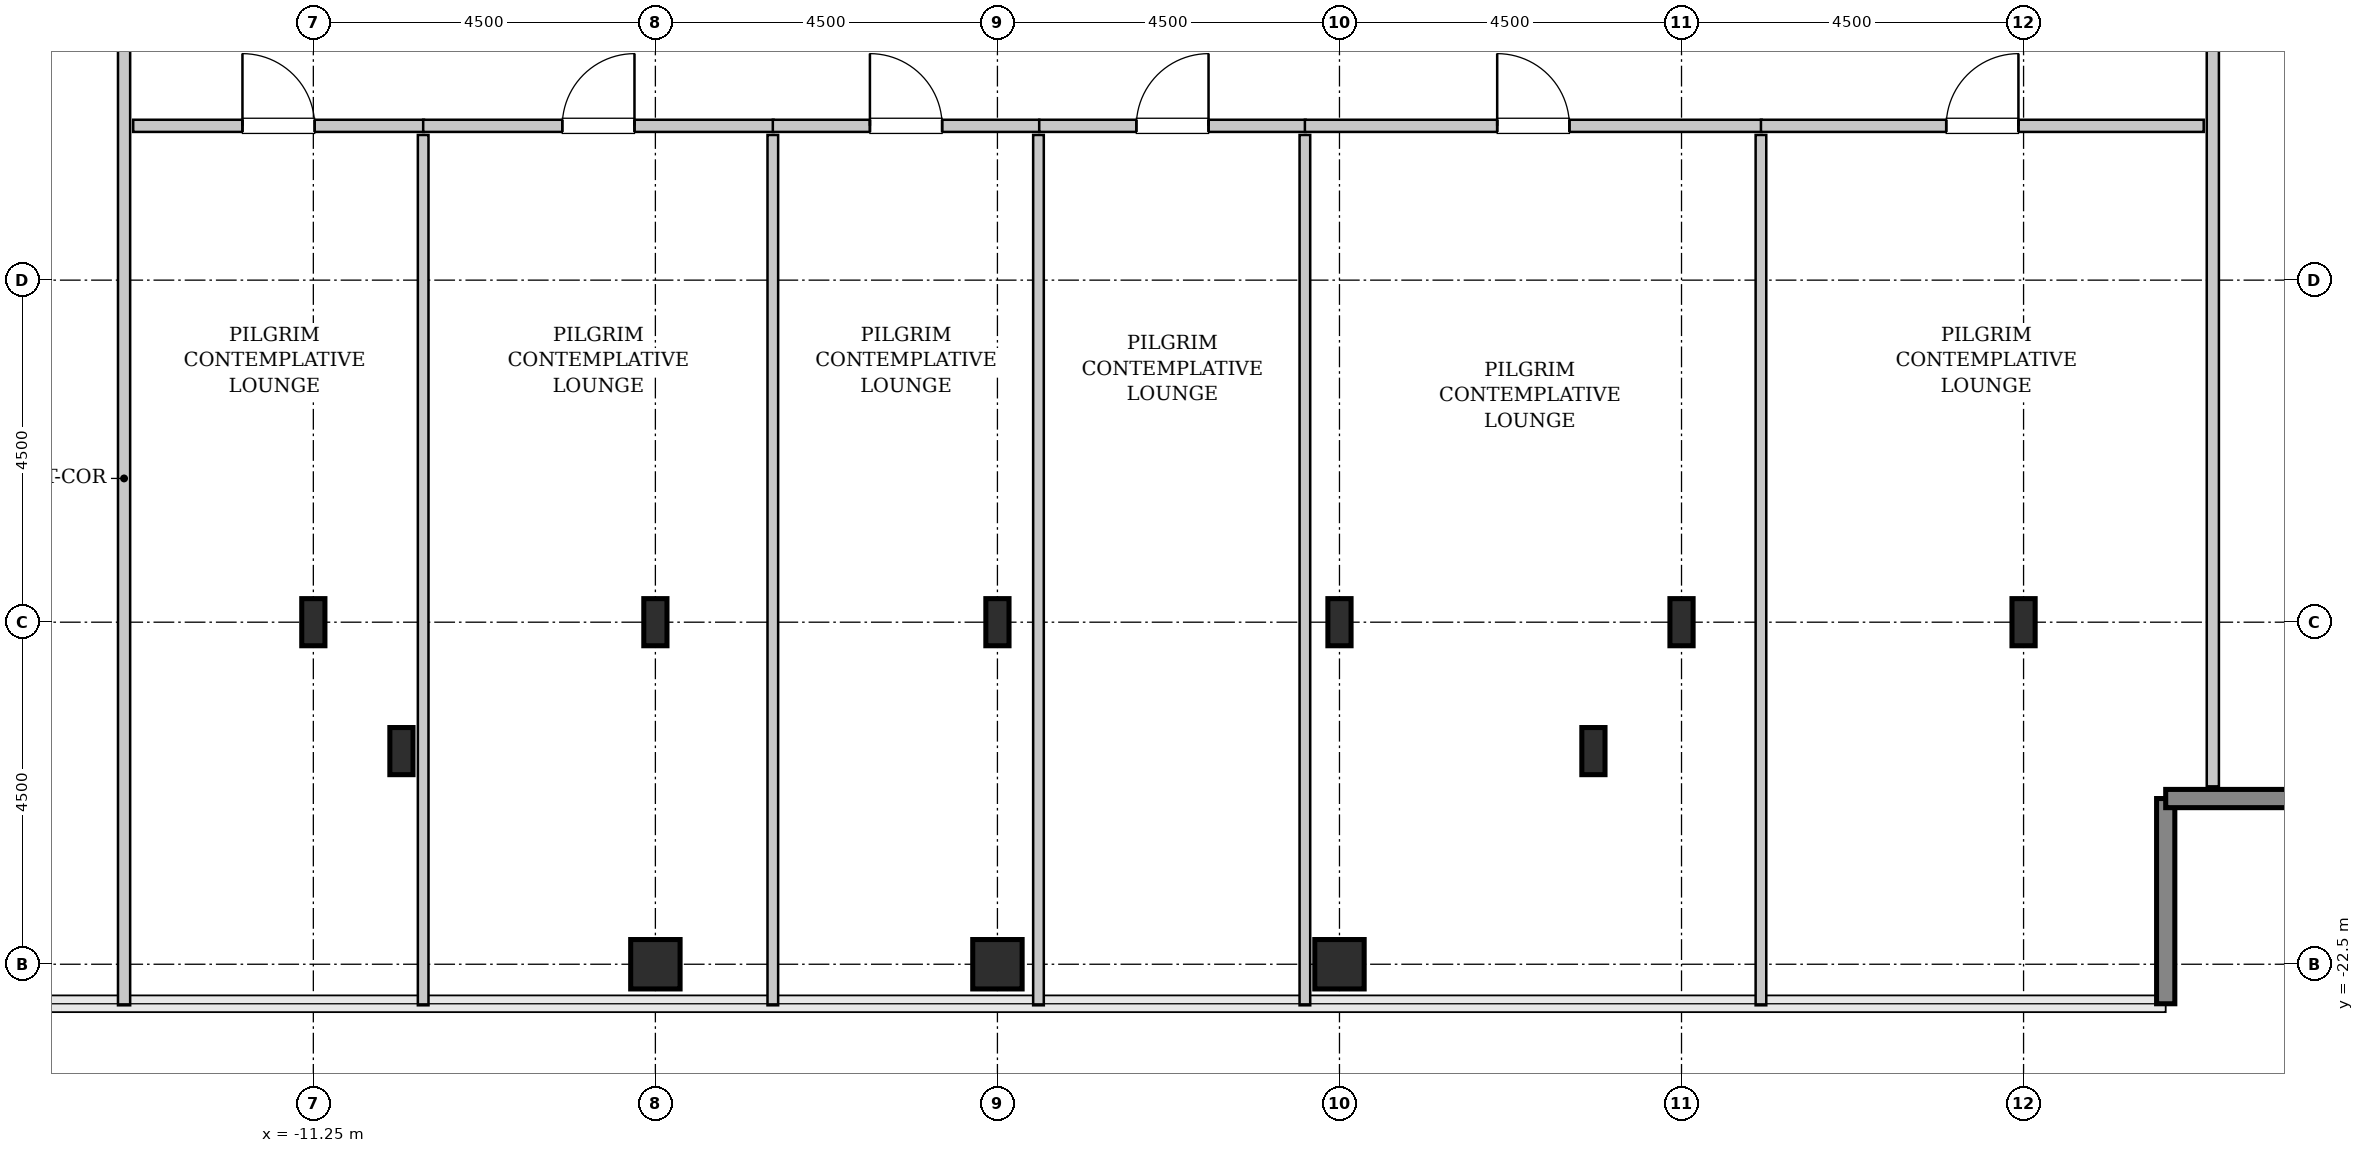
"""IFC4 building model, lengths in metres.
Left out: names, types, materials, properties, quantities, classifications, styles, units other than length and angle.
Written with IfcOpenShell. Run it as: python <this file> out.ifc"""

import sys

from ifc_helpers import new_model, si_unit, direction, frame, frame_2d, origin, origin_2d, place, context, subcontext, project, spatial, rectangle, hollow_rectangle, i_section, extrude, source, transform, mapped, element, fill, save


model = new_model("IFC4")
c1 = context("Model", 3, precision=1e-05, world=origin(), true_north=direction((0.0, 1.0)))
c2 = subcontext(c1, "Body", "Model", "MODEL_VIEW")
j1 = project(units=[si_unit("LENGTHUNIT", "METRE"), si_unit("PLANEANGLEUNIT", "RADIAN")], contexts=[c1])
p1 = place(None, origin())
s1 = spatial("IfcSite", under=j1, at=p1, CompositionType="ELEMENT")
p2 = place(p1, origin())
s2 = spatial("IfcBuilding", under=s1, at=p2, CompositionType="ELEMENT")
p3 = place(p2, frame((0.0, 0.0, 287.4)))
s3 = spatial("IfcBuildingStorey", under=s2, at=p3, CompositionType="ELEMENT", Elevation=287.4)
m1 = source(origin(), c2, "Body", "SweptSolid", [
    extrude(i_section(OverallWidth=0.305, OverallDepth=0.62, WebThickness=0.021, FlangeThickness=0.04, FilletRadius=0.027, at=origin_2d()), origin(), (0.0, 0.0, 1.0), 3.8),
])
for number, where, z_axis, x_axis in (
    (1, (-11.25, -18.0, 0.0), (0.0, 0.0, 1.0), (1.0, 0.0, 0.0)),
    (2, (-10.091, -19.696, 0.0), (0.0, 0.0, 1.0), (1.0, 0.0, 0.0)),
):
    element("IfcColumn", number, at=place(p3, frame(where, z_axis=z_axis, x_axis=x_axis)), inside=s3, PredefinedType="COLUMN", context=c2, shape_type="MappedRepresentation", body=[
        mapped(m1, transform((0.0, 0.0, 0.0), x_axis=(1.0, 0.0, 0.0), y_axis=(0.0, 1.0, 0.0), z_axis=(0.0, 0.0, 1.0), scale=1.0)),
    ])
m2 = source(origin(), c2, "Body", "SweptSolid", [
    extrude(hollow_rectangle(XDim=0.65, YDim=0.65, WallThickness=0.032, InnerFilletRadius=0.032, OuterFilletRadius=0.064, at=origin_2d()), origin(), (0.0, 0.0, 1.0), 3.8),
])
p4 = place(p3, frame((-6.75, -22.5, 0.0), z_axis=(0.0, 0.0, 1.0), x_axis=(1.0, 0.0, 0.0)))
e3 = element("IfcColumn", 3, at=p4, inside=s3, PredefinedType="COLUMN", context=c2, shape_type="MappedRepresentation", body=[
    mapped(m2, transform((0.0, 0.0, 0.0), x_axis=(1.0, 0.0, 0.0), y_axis=(0.0, 1.0, 0.0), z_axis=(0.0, 0.0, 1.0), scale=1.0)),
])
p5 = place(p3, frame((-6.75, -18.0, 0.0), z_axis=(0.0, 0.0, 1.0), x_axis=(1.0, 0.0, 0.0)))
e4 = element("IfcColumn", 4, at=p5, inside=s3, PredefinedType="COLUMN", context=c2, shape_type="MappedRepresentation", body=[
    mapped(m1, transform((0.0, 0.0, 0.0), x_axis=(1.0, 0.0, 0.0), y_axis=(0.0, 1.0, 0.0), z_axis=(0.0, 0.0, 1.0), scale=1.0)),
])
p6 = place(p3, frame((-2.25, -22.5, 0.0), z_axis=(0.0, 0.0, 1.0), x_axis=(1.0, 0.0, 0.0)))
e5 = element("IfcColumn", 5, at=p6, inside=s3, PredefinedType="COLUMN", context=c2, shape_type="MappedRepresentation", body=[
    mapped(m2, transform((0.0, 0.0, 0.0), x_axis=(1.0, 0.0, 0.0), y_axis=(0.0, 1.0, 0.0), z_axis=(0.0, 0.0, 1.0), scale=1.0)),
])
p7 = place(p3, frame((-2.25, -18.0, 0.0), z_axis=(0.0, 0.0, 1.0), x_axis=(1.0, 0.0, 0.0)))
e6 = element("IfcColumn", 6, at=p7, inside=s3, PredefinedType="COLUMN", context=c2, shape_type="MappedRepresentation", body=[
    mapped(m1, transform((0.0, 0.0, 0.0), x_axis=(1.0, 0.0, 0.0), y_axis=(0.0, 1.0, 0.0), z_axis=(0.0, 0.0, 1.0), scale=1.0)),
])
p8 = place(p3, frame((2.25, -22.5, 0.0), z_axis=(0.0, 0.0, 1.0), x_axis=(1.0, 0.0, 0.0)))
e7 = element("IfcColumn", 7, at=p8, inside=s3, PredefinedType="COLUMN", context=c2, shape_type="MappedRepresentation", body=[
    mapped(m2, transform((0.0, 0.0, 0.0), x_axis=(1.0, 0.0, 0.0), y_axis=(0.0, 1.0, 0.0), z_axis=(0.0, 0.0, 1.0), scale=1.0)),
])
for number, where, z_axis, x_axis in (
    (8, (2.25, -18.0, 0.0), (0.0, 0.0, 1.0), (1.0, 0.0, 0.0)),
    (9, (5.591, -19.696, 0.0), (0.0, 0.0, 1.0), (1.0, 0.0, 0.0)),
    (10, (6.75, -18.0, 0.0), (0.0, 0.0, 1.0), (1.0, 0.0, 0.0)),
    (11, (11.25, -18.0, 0.0), (0.0, 0.0, 1.0), (1.0, 0.0, 0.0)),
):
    element("IfcColumn", number, at=place(p3, frame(where, z_axis=z_axis, x_axis=x_axis)), inside=s3, PredefinedType="COLUMN", context=c2, shape_type="MappedRepresentation", body=[
        mapped(m1, transform((0.0, 0.0, 0.0), x_axis=(1.0, 0.0, 0.0), y_axis=(0.0, 1.0, 0.0), z_axis=(0.0, 0.0, 1.0), scale=1.0)),
    ])
m3 = source(origin(), c2, "Body", "SweptSolid", [
    extrude(rectangle(XDim=2.7, YDim=0.24, at=frame_2d((1.35, 0.0))), origin(), (0.0, 0.0, 1.0), 3.55),
])
for number, where, z_axis, x_axis in (
    (12, (13.12, -23.02, 0.0), (0.0, 0.0, 1.0), (0.0, 1.0, 0.0)),
    (13, (13.12, -20.32, 0.0), (0.0, 0.0, 1.0), (1.0, 0.0, 0.0)),
):
    element("IfcWall", number, at=place(p3, frame(where, z_axis=z_axis, x_axis=x_axis)), inside=s3, PredefinedType="SHEAR", context=c2, shape_type="MappedRepresentation", body=[
        mapped(m3, transform((0.0, 0.0, 0.0), x_axis=(1.0, 0.0, 0.0), y_axis=(0.0, 1.0, 0.0), z_axis=(0.0, 0.0, 1.0), scale=1.0)),
    ])
m4 = source(origin(), c2, "Body", "SweptSolid", [
    extrude(rectangle(XDim=17.045, YDim=0.16, at=frame_2d((8.522, 0.0))), origin(), (0.0, 0.0, 1.0), 3.535),
])
p9 = place(p3, frame((-13.74, -23.04, 0.0), z_axis=(0.0, 0.0, 1.0), x_axis=(0.0, 1.0, 0.0)))
e14 = element("IfcWall", 14, at=p9, inside=s3, PredefinedType="PARTITIONING", context=c2, shape_type="MappedRepresentation", body=[
    mapped(m4, transform((0.0, 0.0, 0.0), x_axis=(1.0, 0.0, 0.0), y_axis=(0.0, 1.0, 0.0), z_axis=(0.0, 0.0, 1.0), scale=1.0)),
])
p10 = place(p9, frame((13.812, 0.0, 0.0)))
e15 = element("IfcOpeningElement", 15, at=p10, cuts=e14, PredefinedType="OPENING", context=c2, shape_type="SweptSolid", body=[
    extrude(rectangle(XDim=0.95, YDim=2.1, at=frame_2d((0.475, 1.05))), frame((0.0, 0.09, 0.0), z_axis=(0.0, -1.0, 0.0), x_axis=(1.0, 0.0, 0.0)), (0.0, 0.0, 1.0), 0.18),
])
m5 = source(origin(), c2, "Body", "SweptSolid", [
    extrude(rectangle(XDim=11.665, YDim=0.16, at=frame_2d((5.833, 0.0))), origin(), (0.0, 0.0, 1.0), 3.535),
])
p11 = place(p3, frame((13.74, -20.16, 0.0), z_axis=(0.0, 0.0, 1.0), x_axis=(0.0, 1.0, 0.0)))
e16 = element("IfcWall", 16, at=p11, inside=s3, PredefinedType="PARTITIONING", context=c2, shape_type="MappedRepresentation", body=[
    mapped(m5, transform((0.0, 0.0, 0.0), x_axis=(1.0, 0.0, 0.0), y_axis=(0.0, 1.0, 0.0), z_axis=(0.0, 0.0, 1.0), scale=1.0)),
])
p12 = place(p11, frame((9.683, 0.0, 0.0)))
e17 = element("IfcOpeningElement", 17, at=p12, cuts=e16, PredefinedType="OPENING", context=c2, shape_type="SweptSolid", body=[
    extrude(rectangle(XDim=0.95, YDim=2.1, at=frame_2d((0.475, 1.05))), frame((0.0, 0.09, 0.0), z_axis=(0.0, -1.0, 0.0), x_axis=(1.0, 0.0, 0.0)), (0.0, 0.0, 1.0), 0.18),
])
m6 = source(origin(), c2, "Body", "SweptSolid", [
    extrude(rectangle(XDim=3.825, YDim=0.16, at=frame_2d((1.913, 0.0))), origin(), (0.0, 0.0, 1.0), 3.535),
])
p13 = place(p3, frame((-13.62, -11.47, 0.0), z_axis=(0.0, 0.0, 1.0), x_axis=(1.0, 0.0, 0.0)))
e18 = element("IfcWall", 18, at=p13, inside=s3, PredefinedType="PARTITIONING", context=c2, shape_type="MappedRepresentation", body=[
    mapped(m6, transform((0.0, 0.0, 0.0), x_axis=(1.0, 0.0, 0.0), y_axis=(0.0, 1.0, 0.0), z_axis=(0.0, 0.0, 1.0), scale=1.0)),
])
p14 = place(p13, frame((1.438, 0.0, 0.0)))
e19 = element("IfcOpeningElement", 19, at=p14, cuts=e18, PredefinedType="OPENING", context=c2, shape_type="SweptSolid", body=[
    extrude(rectangle(XDim=0.95, YDim=2.1, at=frame_2d((0.475, 1.05))), frame((0.0, 0.09, 0.0), z_axis=(0.0, -1.0, 0.0), x_axis=(1.0, 0.0, 0.0)), (0.0, 0.0, 1.0), 0.18),
])
m7 = source(origin(), c2, "Body", "SweptSolid", [
    extrude(rectangle(XDim=11.45, YDim=0.14, at=frame_2d((5.725, 0.0))), origin(), (0.0, 0.0, 1.0), 3.535),
])
p15 = place(p3, frame((-9.805, -23.04, 0.0), z_axis=(0.0, 0.0, 1.0), x_axis=(0.0, 1.0, 0.0)))
e20 = element("IfcWall", 20, at=p15, inside=s3, PredefinedType="PARTITIONING", context=c2, shape_type="MappedRepresentation", body=[
    mapped(m7, transform((0.0, 0.0, 0.0), x_axis=(1.0, 0.0, 0.0), y_axis=(0.0, 1.0, 0.0), z_axis=(0.0, 0.0, 1.0), scale=1.0)),
])
m8 = source(origin(), c2, "Body", "SweptSolid", [
    extrude(rectangle(XDim=4.61, YDim=0.16, at=frame_2d((2.305, 0.0))), origin(), (0.0, 0.0, 1.0), 3.535),
])
p16 = place(p3, frame((-9.805, -11.47, 0.0), z_axis=(0.0, 0.0, 1.0), x_axis=(1.0, 0.0, 0.0)))
e21 = element("IfcWall", 21, at=p16, inside=s3, PredefinedType="PARTITIONING", context=c2, shape_type="MappedRepresentation", body=[
    mapped(m8, transform((0.0, 0.0, 0.0), x_axis=(1.0, 0.0, 0.0), y_axis=(0.0, 1.0, 0.0), z_axis=(0.0, 0.0, 1.0), scale=1.0)),
])
p17 = place(p16, frame((1.83, 0.0, 0.0)))
e22 = element("IfcOpeningElement", 22, at=p17, cuts=e21, PredefinedType="OPENING", context=c2, shape_type="SweptSolid", body=[
    extrude(rectangle(XDim=0.95, YDim=2.1, at=frame_2d((0.475, 1.05))), frame((0.0, 0.09, 0.0), z_axis=(0.0, -1.0, 0.0), x_axis=(1.0, 0.0, 0.0)), (0.0, 0.0, 1.0), 0.18),
])
p18 = place(p3, frame((-5.205, -23.04, 0.0), z_axis=(0.0, 0.0, 1.0), x_axis=(0.0, 1.0, 0.0)))
e23 = element("IfcWall", 23, at=p18, inside=s3, PredefinedType="PARTITIONING", context=c2, shape_type="MappedRepresentation", body=[
    mapped(m7, transform((0.0, 0.0, 0.0), x_axis=(1.0, 0.0, 0.0), y_axis=(0.0, 1.0, 0.0), z_axis=(0.0, 0.0, 1.0), scale=1.0)),
])
m9 = source(origin(), c2, "Body", "SweptSolid", [
    extrude(rectangle(XDim=3.505, YDim=0.16, at=frame_2d((1.752, 0.0))), origin(), (0.0, 0.0, 1.0), 3.535),
])
p19 = place(p3, frame((-5.205, -11.47, 0.0), z_axis=(0.0, 0.0, 1.0), x_axis=(1.0, 0.0, 0.0)))
e24 = element("IfcWall", 24, at=p19, inside=s3, PredefinedType="PARTITIONING", context=c2, shape_type="MappedRepresentation", body=[
    mapped(m9, transform((0.0, 0.0, 0.0), x_axis=(1.0, 0.0, 0.0), y_axis=(0.0, 1.0, 0.0), z_axis=(0.0, 0.0, 1.0), scale=1.0)),
])
p20 = place(p19, frame((1.278, 0.0, 0.0)))
e25 = element("IfcOpeningElement", 25, at=p20, cuts=e24, PredefinedType="OPENING", context=c2, shape_type="SweptSolid", body=[
    extrude(rectangle(XDim=0.95, YDim=2.1, at=frame_2d((0.475, 1.05))), frame((0.0, 0.09, 0.0), z_axis=(0.0, -1.0, 0.0), x_axis=(1.0, 0.0, 0.0)), (0.0, 0.0, 1.0), 0.18),
])
p21 = place(p3, frame((-1.71, -23.04, 0.0), z_axis=(0.0, 0.0, 1.0), x_axis=(0.0, 1.0, 0.0)))
e26 = element("IfcWall", 26, at=p21, inside=s3, PredefinedType="PARTITIONING", context=c2, shape_type="MappedRepresentation", body=[
    mapped(m7, transform((0.0, 0.0, 0.0), x_axis=(1.0, 0.0, 0.0), y_axis=(0.0, 1.0, 0.0), z_axis=(0.0, 0.0, 1.0), scale=1.0)),
])
m10 = source(origin(), c2, "Body", "SweptSolid", [
    extrude(rectangle(XDim=3.505, YDim=0.16, at=frame_2d((1.752, 0.0))), origin(), (0.0, 0.0, 1.0), 3.535),
])
p22 = place(p3, frame((-1.7, -11.47, 0.0), z_axis=(0.0, 0.0, 1.0), x_axis=(1.0, 0.0, 0.0)))
e27 = element("IfcWall", 27, at=p22, inside=s3, PredefinedType="PARTITIONING", context=c2, shape_type="MappedRepresentation", body=[
    mapped(m10, transform((0.0, 0.0, 0.0), x_axis=(1.0, 0.0, 0.0), y_axis=(0.0, 1.0, 0.0), z_axis=(0.0, 0.0, 1.0), scale=1.0)),
])
p23 = place(p22, frame((1.278, 0.0, 0.0)))
e28 = element("IfcOpeningElement", 28, at=p23, cuts=e27, PredefinedType="OPENING", context=c2, shape_type="SweptSolid", body=[
    extrude(rectangle(XDim=0.95, YDim=2.1, at=frame_2d((0.475, 1.05))), frame((0.0, 0.09, 0.0), z_axis=(0.0, -1.0, 0.0), x_axis=(1.0, 0.0, 0.0)), (0.0, 0.0, 1.0), 0.18),
])
m11 = source(origin(), c2, "Body", "SweptSolid", [
    extrude(rectangle(XDim=11.45, YDim=0.14, at=frame_2d((5.725, 0.0))), origin(), (0.0, 0.0, 1.0), 2.925),
])
p24 = place(p3, frame((1.795, -23.04, 0.0), z_axis=(0.0, 0.0, 1.0), x_axis=(0.0, 1.0, 0.0)))
e29 = element("IfcWall", 29, at=p24, inside=s3, PredefinedType="PARTITIONING", context=c2, shape_type="MappedRepresentation", body=[
    mapped(m11, transform((0.0, 0.0, 0.0), x_axis=(1.0, 0.0, 0.0), y_axis=(0.0, 1.0, 0.0), z_axis=(0.0, 0.0, 1.0), scale=1.0)),
])
m12 = source(origin(), c2, "Body", "SweptSolid", [
    extrude(rectangle(XDim=6.01, YDim=0.16, at=frame_2d((3.005, 0.0))), origin(), (0.0, 0.0, 1.0), 3.535),
])
p25 = place(p3, frame((1.795, -11.47, 0.0), z_axis=(0.0, 0.0, 1.0), x_axis=(1.0, 0.0, 0.0)))
e30 = element("IfcWall", 30, at=p25, inside=s3, PredefinedType="PARTITIONING", context=c2, shape_type="MappedRepresentation", body=[
    mapped(m12, transform((0.0, 0.0, 0.0), x_axis=(1.0, 0.0, 0.0), y_axis=(0.0, 1.0, 0.0), z_axis=(0.0, 0.0, 1.0), scale=1.0)),
])
p26 = place(p25, frame((2.53, 0.0, 0.0)))
e31 = element("IfcOpeningElement", 31, at=p26, cuts=e30, PredefinedType="OPENING", context=c2, shape_type="SweptSolid", body=[
    extrude(rectangle(XDim=0.95, YDim=2.1, at=frame_2d((0.475, 1.05))), frame((0.0, 0.09, 0.0), z_axis=(0.0, -1.0, 0.0), x_axis=(1.0, 0.0, 0.0)), (0.0, 0.0, 1.0), 0.18),
])
p27 = place(p3, frame((7.795, -23.04, 0.0), z_axis=(0.0, 0.0, 1.0), x_axis=(0.0, 1.0, 0.0)))
e32 = element("IfcWall", 32, at=p27, inside=s3, PredefinedType="PARTITIONING", context=c2, shape_type="MappedRepresentation", body=[
    mapped(m7, transform((0.0, 0.0, 0.0), x_axis=(1.0, 0.0, 0.0), y_axis=(0.0, 1.0, 0.0), z_axis=(0.0, 0.0, 1.0), scale=1.0)),
])
m13 = source(origin(), c2, "Body", "SweptSolid", [
    extrude(rectangle(XDim=5.825, YDim=0.16, at=frame_2d((2.913, 0.0))), origin(), (0.0, 0.0, 1.0), 3.535),
])
p28 = place(p3, frame((7.795, -11.47, 0.0), z_axis=(0.0, 0.0, 1.0), x_axis=(1.0, 0.0, 0.0)))
e33 = element("IfcWall", 33, at=p28, inside=s3, PredefinedType="PARTITIONING", context=c2, shape_type="MappedRepresentation", body=[
    mapped(m13, transform((0.0, 0.0, 0.0), x_axis=(1.0, 0.0, 0.0), y_axis=(0.0, 1.0, 0.0), z_axis=(0.0, 0.0, 1.0), scale=1.0)),
])
p29 = place(p28, frame((2.438, 0.0, 0.0)))
e34 = element("IfcOpeningElement", 34, at=p29, cuts=e33, PredefinedType="OPENING", context=c2, shape_type="SweptSolid", body=[
    extrude(rectangle(XDim=0.95, YDim=2.1, at=frame_2d((0.475, 1.05))), frame((0.0, 0.09, 0.0), z_axis=(0.0, -1.0, 0.0), x_axis=(1.0, 0.0, 0.0)), (0.0, 0.0, 1.0), 0.18),
])
m14 = source(origin(), c2, "Body", "SweptSolid", [
    extrude(rectangle(XDim=0.95, YDim=2.1, at=frame_2d((0.475, 1.05))), frame((0.0, 0.025, 0.0), z_axis=(0.0, -1.0, 0.0), x_axis=(1.0, 0.0, 0.0)), (0.0, 0.0, 1.0), 0.05),
])
p30 = place(p14, origin())
e35 = element("IfcDoor", 35, at=p30, inside=s3, OperationType="SINGLE_SWING_LEFT", PredefinedType="DOOR", context=c2, shape_type="MappedRepresentation", body=[
    mapped(m14, transform((0.0, 0.0, 0.0), x_axis=(1.0, 0.0, 0.0), y_axis=(0.0, 1.0, 0.0), z_axis=(0.0, 0.0, 1.0), scale=1.0)),
])
fill(e19, e35)
p31 = place(p17, origin())
e36 = element("IfcDoor", 36, at=p31, inside=s3, OperationType="SINGLE_SWING_RIGHT", PredefinedType="DOOR", context=c2, shape_type="MappedRepresentation", body=[
    mapped(m14, transform((0.0, 0.0, 0.0), x_axis=(1.0, 0.0, 0.0), y_axis=(0.0, 1.0, 0.0), z_axis=(0.0, 0.0, 1.0), scale=1.0)),
])
fill(e22, e36)
p32 = place(p20, origin())
e37 = element("IfcDoor", 37, at=p32, inside=s3, OperationType="SINGLE_SWING_LEFT", PredefinedType="DOOR", context=c2, shape_type="MappedRepresentation", body=[
    mapped(m14, transform((0.0, 0.0, 0.0), x_axis=(1.0, 0.0, 0.0), y_axis=(0.0, 1.0, 0.0), z_axis=(0.0, 0.0, 1.0), scale=1.0)),
])
fill(e25, e37)
p33 = place(p23, origin())
e38 = element("IfcDoor", 38, at=p33, inside=s3, OperationType="SINGLE_SWING_RIGHT", PredefinedType="DOOR", context=c2, shape_type="MappedRepresentation", body=[
    mapped(m14, transform((0.0, 0.0, 0.0), x_axis=(1.0, 0.0, 0.0), y_axis=(0.0, 1.0, 0.0), z_axis=(0.0, 0.0, 1.0), scale=1.0)),
])
fill(e28, e38)
p34 = place(p26, origin())
e39 = element("IfcDoor", 39, at=p34, inside=s3, OperationType="SINGLE_SWING_LEFT", PredefinedType="DOOR", context=c2, shape_type="MappedRepresentation", body=[
    mapped(m14, transform((0.0, 0.0, 0.0), x_axis=(1.0, 0.0, 0.0), y_axis=(0.0, 1.0, 0.0), z_axis=(0.0, 0.0, 1.0), scale=1.0)),
])
fill(e31, e39)
p35 = place(p29, origin())
e40 = element("IfcDoor", 40, at=p35, inside=s3, OperationType="SINGLE_SWING_RIGHT", PredefinedType="DOOR", context=c2, shape_type="MappedRepresentation", body=[
    mapped(m14, transform((0.0, 0.0, 0.0), x_axis=(1.0, 0.0, 0.0), y_axis=(0.0, 1.0, 0.0), z_axis=(0.0, 0.0, 1.0), scale=1.0)),
])
fill(e34, e40)
save(model, sys.argv[1])
